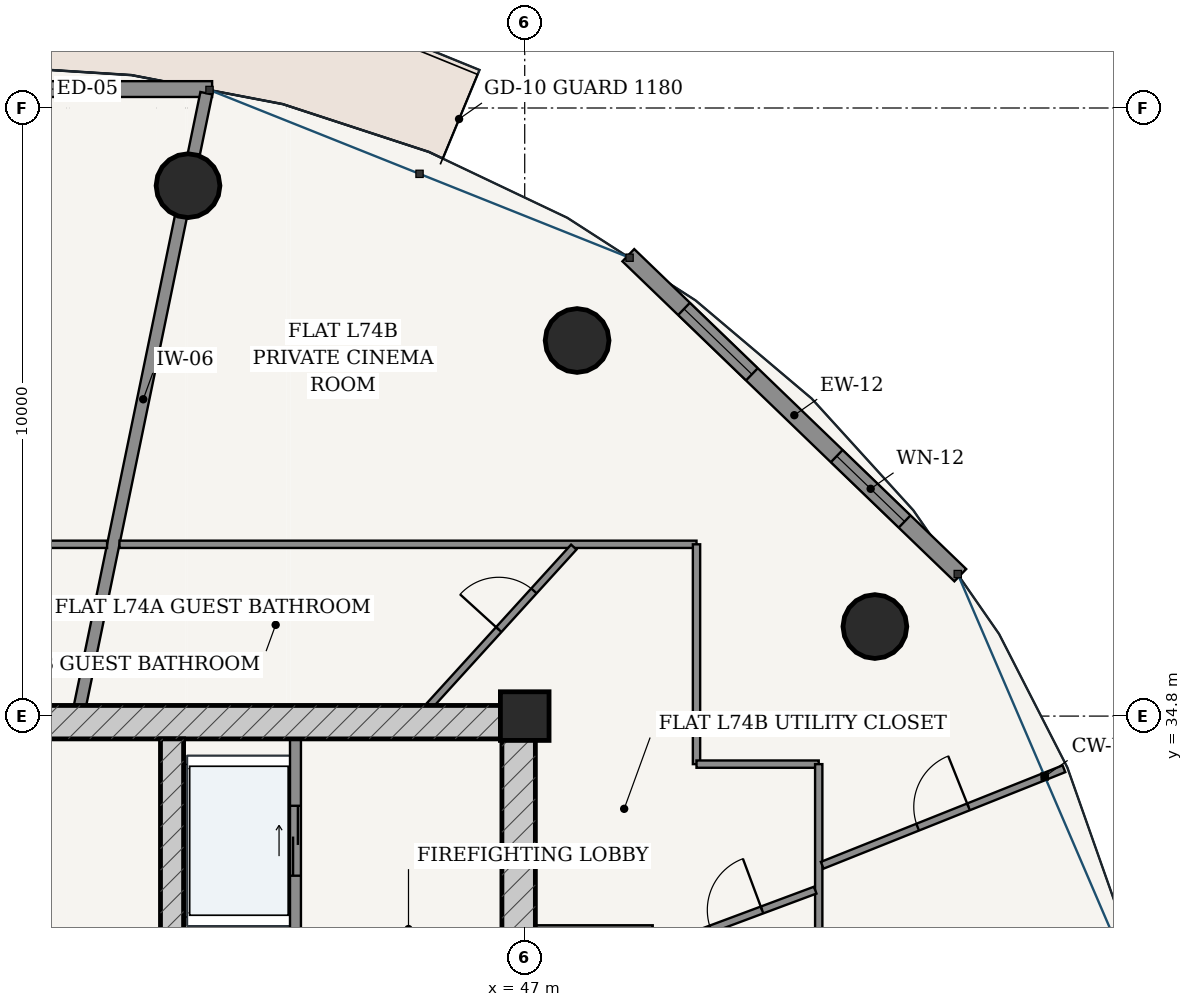
"""IFC4 building model, lengths in metres.
Left out: names, types, materials, properties, quantities, classifications, styles, units other than length and angle.
Written with IfcOpenShell. Run it as: python <this file> out.ifc"""

import sys

from ifc_helpers import new_model, si_unit, direction, frame, frame_2d, origin, origin_2d, place, context, subcontext, project, spatial, rectangle, hollow_circle, extrude, source, transform, mapped, element, fill, save


model = new_model("IFC4")
c1 = context("Model", 3, precision=1e-05, world=origin(), true_north=direction((-0.2419218956, 0.970295726276)))
c2 = subcontext(c1, "Body", "Model", "MODEL_VIEW")
j1 = project(units=[si_unit("LENGTHUNIT", "METRE"), si_unit("PLANEANGLEUNIT", "RADIAN")], contexts=[c1])
p1 = place(None, origin())
s1 = spatial("IfcSite", under=j1, at=p1, CompositionType="ELEMENT")
p2 = place(p1, origin())
s2 = spatial("IfcBuilding", under=s1, at=p2, CompositionType="ELEMENT")
p3 = place(p2, frame((0.0, 0.0, 281.95)))
s3 = spatial("IfcBuildingStorey", under=s2, at=p3, CompositionType="ELEMENT", Elevation=281.95)
p4 = place(p3, frame((47.0, 34.8, 0.0), z_axis=(0.0, 0.0, 1.0), x_axis=(1.0, 0.0, 0.0)))
e1 = element("IfcColumn", 1, at=p4, inside=s3, PredefinedType="COLUMN", context=c2, shape_type="SweptSolid", body=[
    extrude(rectangle(XDim=0.8, YDim=0.8, at=origin_2d()), origin(), (0.0, 0.0, 1.0), 3.75),
])
p5 = place(p3, frame((28.825, 34.7, 0.0), z_axis=(0.0, 0.0, 1.0), x_axis=(1.0, 0.0, 0.0)))
e2 = element("IfcWall", 2, at=p5, inside=s3, PredefinedType="SHEAR", context=c2, shape_type="SweptSolid", body=[
    extrude(rectangle(XDim=18.35, YDim=0.55, at=frame_2d((9.175, 0.0))), origin(), (0.0, 0.0, 1.0), 3.49),
])
p6 = place(p3, frame((46.9, 19.175, 0.0), z_axis=(0.0, 0.0, 1.0), x_axis=(0.0, 1.0, 0.0)))
e3 = element("IfcWall", 3, at=p6, inside=s3, PredefinedType="SHEAR", context=c2, shape_type="SweptSolid", body=[
    extrude(rectangle(XDim=15.25, YDim=0.55, at=frame_2d((7.625, 0.0))), origin(), (0.0, 0.0, 1.0), 3.49),
])
p7 = place(p6, frame((9.875, 0.0, 0.0)))
e4 = element("IfcOpeningElement", 4, at=p7, cuts=e3, PredefinedType="OPENING", context=c2, shape_type="SweptSolid", body=[
    extrude(rectangle(XDim=1.5, YDim=2.2, at=frame_2d((0.75, 1.1))), frame((0.0, 0.285, 0.0), z_axis=(0.0, -1.0, 0.0), x_axis=(1.0, 0.0, 0.0)), (0.0, 0.0, 1.0), 0.57),
])
p8 = place(p3, frame((41.2, 19.175, 0.0), z_axis=(0.0, 0.0, 1.0), x_axis=(0.0, 1.0, 0.0)))
e5 = element("IfcWall", 5, at=p8, inside=s3, PredefinedType="SHEAR", context=c2, shape_type="SweptSolid", body=[
    extrude(rectangle(XDim=15.25, YDim=0.38, at=frame_2d((7.625, 0.0))), origin(), (0.0, 0.0, 1.0), 3.49),
])
p9 = place(p8, frame((7.8, 0.0, 0.0)))
e6 = element("IfcOpeningElement", 6, at=p9, cuts=e5, PredefinedType="OPENING", context=c2, shape_type="SweptSolid", body=[
    extrude(rectangle(XDim=1.05, YDim=2.15, at=frame_2d((0.525, 1.075))), frame((0.0, 0.2, 0.0), z_axis=(0.0, -1.0, 0.0), x_axis=(1.0, 0.0, 0.0)), (0.0, 0.0, 1.0), 0.4),
])
for number, where, z_axis, x_axis in (
    (7, (52.759, 36.272, 0.0), (0.0, 0.0, 1.0), (1.0, 0.0, 0.0)),
    (8, (47.861, 40.977, 0.0), (0.0, 0.0, 1.0), (1.0, 0.0, 0.0)),
    (9, (41.463, 43.522, 0.0), (0.0, 0.0, 1.0), (1.0, 0.0, 0.0)),
):
    element("IfcColumn", number, at=place(p3, frame(where, z_axis=z_axis, x_axis=x_axis)), inside=s3, PredefinedType="COLUMN", context=c2, shape_type="SweptSolid", body=[
        extrude(hollow_circle(Radius=0.525, WallThickness=0.035, at=origin_2d()), origin(), (0.0, 0.0, 1.0), 3.75),
    ])
p10 = place(p3, frame((54.163, 37.117, 0.0), z_axis=(0.0, 0.0, 1.0), x_axis=(-0.719979309073, 0.693995529169, 0.0)))
e10 = element("IfcWall", 10, at=p10, inside=s3, PredefinedType="SOLIDWALL", context=c2, shape_type="SweptSolid", body=[
    extrude(rectangle(XDim=7.583, YDim=0.28, at=frame_2d((3.791, 0.0))), origin(), (0.0, 0.0, 1.0), 3.49),
])
p11 = place(p10, frame((1.272, 0.0, 0.85)))
e11 = element("IfcOpeningElement", 11, at=p11, cuts=e10, PredefinedType="OPENING", context=c2, shape_type="SweptSolid", body=[
    extrude(rectangle(XDim=1.55, YDim=1.95, at=frame_2d((0.775, 0.975))), frame((0.0, 0.15, 0.0), z_axis=(0.0, -1.0, 0.0), x_axis=(1.0, 0.0, 0.0)), (0.0, 0.0, 1.0), 0.3),
])
p12 = place(p10, frame((4.76, 0.0, 0.85)))
e12 = element("IfcOpeningElement", 12, at=p12, cuts=e10, PredefinedType="OPENING", context=c2, shape_type="SweptSolid", body=[
    extrude(rectangle(XDim=1.55, YDim=1.95, at=frame_2d((0.775, 0.975))), frame((0.0, 0.15, 0.0), z_axis=(0.0, -1.0, 0.0), x_axis=(1.0, 0.0, 0.0)), (0.0, 0.0, 1.0), 0.3),
])
p13 = place(p3, frame((41.859, 45.111, 0.0), z_axis=(0.0, 0.0, 1.0), x_axis=(-1.0, 0.0, 0.0)))
e13 = element("IfcWall", 13, at=p13, inside=s3, PredefinedType="SOLIDWALL", context=c2, shape_type="SweptSolid", body=[
    extrude(rectangle(XDim=7.718, YDim=0.26, at=frame_2d((3.859, 0.0))), origin(), (0.0, 0.0, 1.0), 3.49),
])
p14 = place(p13, frame((3.184, 0.0, 0.0)))
e14 = element("IfcOpeningElement", 14, at=p14, cuts=e13, PredefinedType="OPENING", context=c2, shape_type="SweptSolid", body=[
    extrude(rectangle(XDim=1.35, YDim=2.2, at=frame_2d((0.675, 1.1))), frame((0.0, 0.14, 0.0), z_axis=(0.0, -1.0, 0.0), x_axis=(1.0, 0.0, 0.0)), (0.0, 0.0, 1.0), 0.28),
])
p15 = place(p3, frame((43.23, 28.52, 0.0), z_axis=(0.0, 0.0, 1.0), x_axis=(0.0, 1.0, 0.0)))
e15 = element("IfcWall", 15, at=p15, inside=s3, PredefinedType="PARTITIONING", context=c2, shape_type="SweptSolid", body=[
    extrude(rectangle(XDim=5.905, YDim=0.18, at=frame_2d((2.953, 0.0))), origin(), (0.0, 0.0, 1.0), 3.49),
])
p16 = place(p15, frame((0.905, 0.0, 0.0)))
e16 = element("IfcOpeningElement", 16, at=p16, cuts=e15, PredefinedType="OPENING", context=c2, shape_type="SweptSolid", body=[
    extrude(rectangle(XDim=0.85, YDim=2.1, at=frame_2d((0.425, 1.05))), frame((0.0, 0.1, 0.0), z_axis=(0.0, -1.0, 0.0), x_axis=(1.0, 0.0, 0.0)), (0.0, 0.0, 1.0), 0.2),
])
p17 = place(p15, frame((3.655, 0.0, 0.0)))
e17 = element("IfcOpeningElement", 17, at=p17, cuts=e15, PredefinedType="OPENING", context=c2, shape_type="SweptSolid", body=[
    extrude(rectangle(XDim=1.15, YDim=2.2, at=frame_2d((0.575, 1.1))), frame((0.0, 0.1, 0.0), z_axis=(0.0, -1.0, 0.0), x_axis=(1.0, 0.0, 0.0)), (0.0, 0.0, 1.0), 0.2),
])
p18 = place(p3, frame((47.175, 31.28, 0.0), z_axis=(0.0, 0.0, 1.0), x_axis=(1.0, 0.0, 0.0)))
e18 = element("IfcWall", 18, at=p18, inside=s3, PredefinedType="PARTITIONING", context=c2, shape_type="SweptSolid", body=[
    extrude(rectangle(XDim=1.93, YDim=0.16, at=frame_2d((0.965, 0.0))), origin(), (0.0, 0.0, 1.0), 3.49),
])
p19 = place(p3, frame((39.688, 34.977, 0.0), z_axis=(0.0, 0.0, 1.0), x_axis=(0.202091890364, 0.979366564596, 0.0)))
e19 = element("IfcWall", 19, at=p19, inside=s3, PredefinedType="PARTITIONING", context=c2, shape_type="SweptSolid", body=[
    extrude(rectangle(XDim=10.278, YDim=0.2, at=frame_2d((5.139, 0.0))), origin(), (0.0, 0.0, 1.0), 2.575),
])
p20 = place(p3, frame((26.175, 37.625, 0.0), z_axis=(0.0, 0.0, 1.0), x_axis=(1.0, 0.0, 0.0)))
e20 = element("IfcWall", 20, at=p20, inside=s3, PredefinedType="PARTITIONING", context=c2, shape_type="SweptSolid", body=[
    extrude(rectangle(XDim=13.957, YDim=0.12, at=frame_2d((6.979, 0.0))), origin(), (0.0, 0.0, 1.0), 3.015),
])
p21 = place(p20, frame((10.852, 0.0, 0.0)))
e21 = element("IfcOpeningElement", 21, at=p21, cuts=e20, PredefinedType="OPENING", context=c2, shape_type="SweptSolid", body=[
    extrude(rectangle(XDim=0.86, YDim=2.15, at=frame_2d((0.43, 1.075))), frame((0.0, 0.07, 0.0), z_axis=(0.0, -1.0, 0.0), x_axis=(1.0, 0.0, 0.0)), (0.0, 0.0, 1.0), 0.14),
])
p22 = place(p20, frame((4.183, 0.0, 0.0)))
e22 = element("IfcOpeningElement", 22, at=p22, cuts=e20, PredefinedType="OPENING", context=c2, shape_type="SweptSolid", body=[
    extrude(rectangle(XDim=0.9, YDim=2.15, at=frame_2d((0.45, 1.075))), frame((0.0, 0.07, 0.0), z_axis=(0.0, -1.0, 0.0), x_axis=(1.0, 0.0, 0.0)), (0.0, 0.0, 1.0), 0.14),
])
p23 = place(p3, frame((40.336, 37.625, 0.0), z_axis=(0.0, 0.0, 1.0), x_axis=(1.0, 0.0, 0.0)))
e23 = element("IfcWall", 23, at=p23, inside=s3, PredefinedType="PARTITIONING", context=c2, shape_type="SweptSolid", body=[
    extrude(rectangle(XDim=9.489, YDim=0.12, at=frame_2d((4.745, 0.0))), origin(), (0.0, 0.0, 1.0), 3.015),
])
p24 = place(p3, frame((49.825, 37.625, 0.0), z_axis=(0.0, 0.0, 1.0), x_axis=(0.0, -1.0, 0.0)))
e24 = element("IfcWall", 24, at=p24, inside=s3, PredefinedType="PARTITIONING", context=c2, shape_type="SweptSolid", body=[
    extrude(rectangle(XDim=3.615, YDim=0.12, at=frame_2d((1.808, 0.0))), origin(), (0.0, 0.0, 1.0), 3.015),
])
p25 = place(p3, frame((49.825, 34.01, 0.0), z_axis=(0.0, 0.0, 1.0), x_axis=(1.0, 0.0, 0.0)))
e25 = element("IfcWall", 25, at=p25, inside=s3, PredefinedType="PARTITIONING", context=c2, shape_type="SweptSolid", body=[
    extrude(rectangle(XDim=2.01, YDim=0.12, at=frame_2d((1.005, 0.0))), origin(), (0.0, 0.0, 1.0), 3.209),
])
p26 = place(p3, frame((51.835, 34.01, 0.0), z_axis=(0.0, 0.0, 1.0), x_axis=(0.0, -1.0, 0.0)))
e26 = element("IfcWall", 26, at=p26, inside=s3, PredefinedType="PARTITIONING", context=c2, shape_type="SweptSolid", body=[
    extrude(rectangle(XDim=19.545, YDim=0.12, at=frame_2d((9.772, 0.0))), origin(), (0.0, 0.0, 1.0), 3.015),
])
p27 = place(p26, frame((14.768, 0.0, 0.0)))
e27 = element("IfcOpeningElement", 27, at=p27, cuts=e26, PredefinedType="OPENING", context=c2, shape_type="SweptSolid", body=[
    extrude(rectangle(XDim=0.9, YDim=2.15, at=frame_2d((0.45, 1.075))), frame((0.0, 0.07, 0.0), z_axis=(0.0, -1.0, 0.0), x_axis=(1.0, 0.0, 0.0)), (0.0, 0.0, 1.0), 0.14),
])
p28 = place(p26, frame((8.718, 0.0, 0.0)))
e28 = element("IfcOpeningElement", 28, at=p28, cuts=e26, PredefinedType="OPENING", context=c2, shape_type="SweptSolid", body=[
    extrude(rectangle(XDim=0.9, YDim=2.15, at=frame_2d((0.45, 1.075))), frame((0.0, 0.07, 0.0), z_axis=(0.0, -1.0, 0.0), x_axis=(1.0, 0.0, 0.0)), (0.0, 0.0, 1.0), 0.14),
])
p29 = place(p26, frame((4.14, 0.0, 0.0)))
e29 = element("IfcOpeningElement", 29, at=p29, cuts=e26, PredefinedType="OPENING", context=c2, shape_type="SweptSolid", body=[
    extrude(rectangle(XDim=0.9, YDim=2.15, at=frame_2d((0.45, 1.075))), frame((0.0, 0.07, 0.0), z_axis=(0.0, -1.0, 0.0), x_axis=(1.0, 0.0, 0.0)), (0.0, 0.0, 1.0), 0.14),
])
p30 = place(p3, frame((51.893, 32.347, 0.0), z_axis=(0.0, 0.0, 1.0), x_axis=(0.928712556691, 0.370800467966, 0.0)))
e30 = element("IfcWall", 30, at=p30, inside=s3, PredefinedType="PARTITIONING", context=c2, shape_type="SweptSolid", body=[
    extrude(rectangle(XDim=4.28, YDim=0.12, at=frame_2d((2.14, 0.0))), origin(), (0.0, 0.0, 1.0), 3.121),
])
p31 = place(p30, frame((1.69, 0.0, 0.0)))
e31 = element("IfcOpeningElement", 31, at=p31, cuts=e30, PredefinedType="OPENING", context=c2, shape_type="SweptSolid", body=[
    extrude(rectangle(XDim=0.9, YDim=2.15, at=frame_2d((0.45, 1.075))), frame((0.0, 0.07, 0.0), z_axis=(0.0, -1.0, 0.0), x_axis=(1.0, 0.0, 0.0)), (0.0, 0.0, 1.0), 0.14),
])
p32 = place(p3, frame((49.185, 30.971, 0.0), z_axis=(0.0, 0.0, 1.0), x_axis=(0.93696600231, 0.349420535338, 0.0)))
e32 = element("IfcWall", 32, at=p32, inside=s3, PredefinedType="PARTITIONING", context=c2, shape_type="SweptSolid", body=[
    extrude(rectangle(XDim=2.766, YDim=0.12, at=frame_2d((1.383, 0.0))), origin(), (0.0, 0.0, 1.0), 3.209),
])
p33 = place(p32, frame((0.933, 0.0, 0.0)))
e33 = element("IfcOpeningElement", 33, at=p33, cuts=e32, PredefinedType="OPENING", context=c2, shape_type="SweptSolid", body=[
    extrude(rectangle(XDim=0.9, YDim=2.15, at=frame_2d((0.45, 1.075))), frame((0.0, 0.07, 0.0), z_axis=(0.0, -1.0, 0.0), x_axis=(1.0, 0.0, 0.0)), (0.0, 0.0, 1.0), 0.14),
])
p34 = place(p3, frame((45.439, 34.977, 0.0), z_axis=(0.0, 0.0, 1.0), x_axis=(0.672980108938, 0.739660579573, 0.0)))
e34 = element("IfcWall", 34, at=p34, inside=s3, PredefinedType="PARTITIONING", context=c2, shape_type="SweptSolid", body=[
    extrude(rectangle(XDim=3.519, YDim=0.12, at=frame_2d((1.759, 0.0))), origin(), (0.0, 0.0, 1.0), 3.015),
])
p35 = place(p34, frame((1.685, 0.0, 0.0)))
e35 = element("IfcOpeningElement", 35, at=p35, cuts=e34, PredefinedType="OPENING", context=c2, shape_type="SweptSolid", body=[
    extrude(rectangle(XDim=0.86, YDim=2.15, at=frame_2d((0.43, 1.075))), frame((0.0, 0.07, 0.0), z_axis=(0.0, -1.0, 0.0), x_axis=(1.0, 0.0, 0.0)), (0.0, 0.0, 1.0), 0.14),
])
m1 = source(origin(), c2, "Body", "SweptSolid", [
    extrude(rectangle(XDim=1.55, YDim=1.95, at=frame_2d((0.775, 0.975))), frame((0.0, 0.03, 0.0), z_axis=(0.0, -1.0, 0.0), x_axis=(1.0, 0.0, 0.0)), (0.0, 0.0, 1.0), 0.06),
])
p36 = place(p11, origin())
e36 = element("IfcWindow", 36, at=p36, inside=s3, PartitioningType="SINGLE_PANEL", PredefinedType="WINDOW", context=c2, shape_type="MappedRepresentation", body=[
    mapped(m1, transform((0.0, 0.0, 0.0), scale=1.0)),
])
fill(e11, e36)
p37 = place(p12, origin())
e37 = element("IfcWindow", 37, at=p37, inside=s3, PartitioningType="SINGLE_PANEL", PredefinedType="WINDOW", context=c2, shape_type="MappedRepresentation", body=[
    mapped(m1, transform((0.0, 0.0, 0.0), scale=1.0)),
])
fill(e12, e37)
m2 = source(origin(), c2, "Body", "SweptSolid", [
    extrude(rectangle(XDim=1.15, YDim=2.2, at=frame_2d((0.575, 1.1))), frame((0.0, 0.025, 0.0), z_axis=(0.0, -1.0, 0.0), x_axis=(1.0, 0.0, 0.0)), (0.0, 0.0, 1.0), 0.05),
])
p38 = place(p17, origin())
e38 = element("IfcDoor", 38, at=p38, inside=s3, OperationType="DOUBLE_DOOR_SLIDING", PredefinedType="DOOR", context=c2, shape_type="MappedRepresentation", body=[
    mapped(m2, transform((0.0, 0.0, 0.0), scale=1.0)),
])
fill(e17, e38)
m3 = source(origin(), c2, "Body", "SweptSolid", [
    extrude(rectangle(XDim=0.9, YDim=2.15, at=frame_2d((0.45, 1.075))), frame((0.0, 0.025, 0.0), z_axis=(0.0, -1.0, 0.0), x_axis=(1.0, 0.0, 0.0)), (0.0, 0.0, 1.0), 0.05),
])
p39 = place(p33, origin())
e39 = element("IfcDoor", 39, at=p39, inside=s3, OperationType="SINGLE_SWING_RIGHT", PredefinedType="DOOR", context=c2, shape_type="MappedRepresentation", body=[
    mapped(m3, transform((0.0, 0.0, 0.0), scale=1.0)),
])
fill(e33, e39)
m4 = source(origin(), c2, "Body", "SweptSolid", [
    extrude(rectangle(XDim=0.86, YDim=2.15, at=frame_2d((0.43, 1.075))), frame((0.0, 0.025, 0.0), z_axis=(0.0, -1.0, 0.0), x_axis=(1.0, 0.0, 0.0)), (0.0, 0.0, 1.0), 0.05),
])
p40 = place(p35, origin())
e40 = element("IfcDoor", 40, at=p40, inside=s3, OperationType="SINGLE_SWING_LEFT", PredefinedType="DOOR", context=c2, shape_type="MappedRepresentation", body=[
    mapped(m4, transform((0.0, 0.0, 0.0), scale=1.0)),
])
fill(e35, e40)
p41 = place(p31, origin())
e41 = element("IfcDoor", 41, at=p41, inside=s3, OperationType="SINGLE_SWING_RIGHT", PredefinedType="DOOR", context=c2, shape_type="MappedRepresentation", body=[
    mapped(m3, transform((0.0, 0.0, 0.0), scale=1.0)),
])
fill(e31, e41)
save(model, sys.argv[1])
